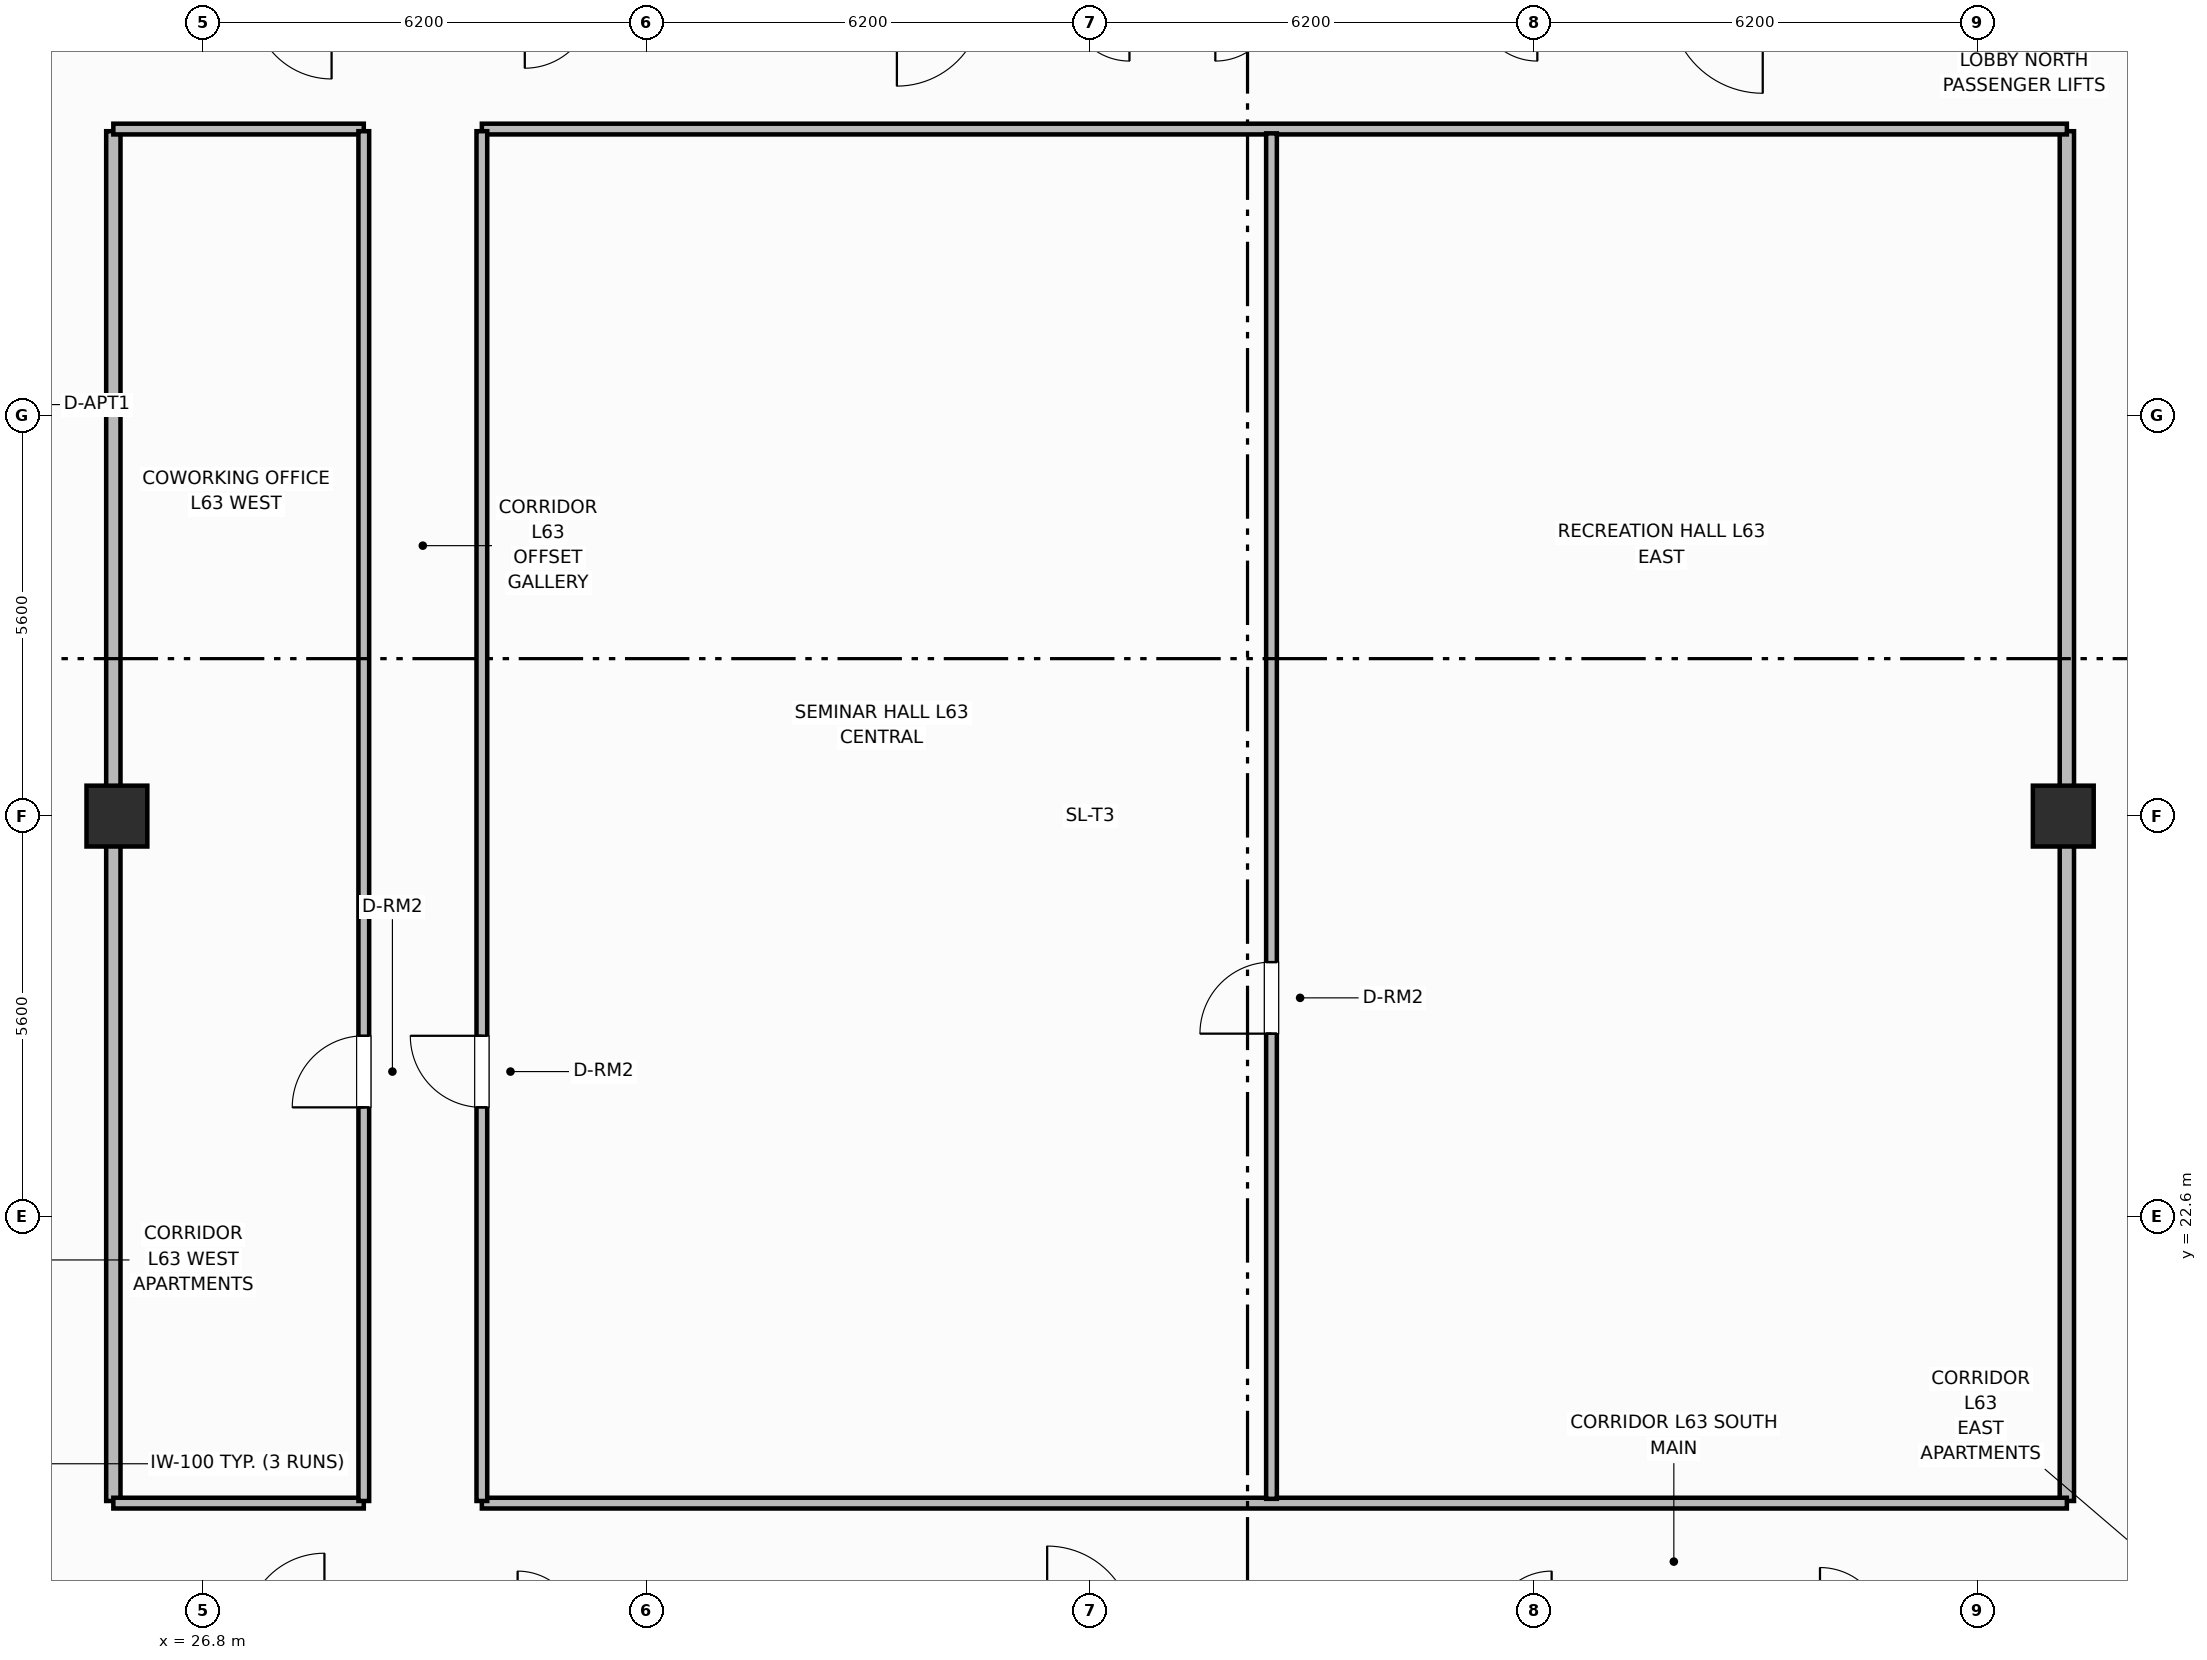
"""IFC4 building model, lengths in metres.
Left out: names, types, materials, properties, quantities, classifications, styles, units other than length and angle.
Written with IfcOpenShell. Run it as: python <this file> out.ifc"""

import sys

from ifc_helpers import new_model, si_unit, direction, frame, frame_2d, origin, origin_2d, place, context, subcontext, project, spatial, rectangle, extrude, element, fill, save


model = new_model("IFC4")
c1 = context("Model", 3, precision=1e-05, world=origin(), true_north=direction((0.0, 1.0)))
c2 = subcontext(c1, "Body", "Model", "MODEL_VIEW")
j1 = project(units=[si_unit("LENGTHUNIT", "METRE"), si_unit("PLANEANGLEUNIT", "RADIAN")], contexts=[c1])
p1 = place(None, origin())
s1 = spatial("IfcSite", under=j1, at=p1, CompositionType="ELEMENT")
p2 = place(p1, origin())
s2 = spatial("IfcBuilding", under=s1, at=p2, CompositionType="ELEMENT")
p3 = place(p2, frame((0.0, 0.0, 251.7)))
s3 = spatial("IfcBuildingStorey", under=s2, at=p3, CompositionType="ELEMENT", Elevation=251.7)
for number, where, z_axis, x_axis in (
    (1, (25.6, 28.2, 0.0), (0.0, 0.0, 1.0), (1.0, 0.0, 0.0)),
    (2, (52.8, 28.2, 0.0), (0.0, 0.0, 1.0), (1.0, 0.0, 0.0)),
):
    element("IfcColumn", number, at=place(p3, frame(where, z_axis=z_axis, x_axis=x_axis)), inside=s3, PredefinedType="COLUMN", context=c2, shape_type="SweptSolid", body=[
        extrude(rectangle(XDim=0.85, YDim=0.85, at=origin_2d()), origin(), (0.0, 0.0, 1.0), 3.7),
    ])
for number, where, z_axis, x_axis in (
    (3, (25.55, 18.63, 0.0), (0.0, 0.0, 1.0), (0.0, 1.0, 0.0)),
    (4, (52.85, 18.63, 0.0), (0.0, 0.0, 1.0), (0.0, 1.0, 0.0)),
):
    element("IfcWall", number, at=place(p3, frame(where, z_axis=z_axis, x_axis=x_axis)), inside=s3, PredefinedType="PARTITIONING", context=c2, shape_type="SweptSolid", body=[
        extrude(rectangle(XDim=19.14, YDim=0.2, at=frame_2d((9.57, 0.0))), origin(), (0.0, 0.0, 1.0), 2.56),
    ])
p4 = place(p3, frame((25.55, 18.6, 0.0), z_axis=(0.0, 0.0, 1.0), x_axis=(1.0, 0.0, 0.0)))
e5 = element("IfcWall", 5, at=p4, inside=s3, PredefinedType="PARTITIONING", context=c2, shape_type="SweptSolid", body=[
    extrude(rectangle(XDim=3.5, YDim=0.15, at=frame_2d((1.75, 0.0))), origin(), (0.0, 0.0, 1.0), 2.56),
])
p5 = place(p3, frame((30.7, 18.6, 0.0), z_axis=(0.0, 0.0, 1.0), x_axis=(1.0, 0.0, 0.0)))
e6 = element("IfcWall", 6, at=p5, inside=s3, PredefinedType="PARTITIONING", context=c2, shape_type="SweptSolid", body=[
    extrude(rectangle(XDim=22.15, YDim=0.15, at=frame_2d((11.075, 0.0))), origin(), (0.0, 0.0, 1.0), 2.56),
])
p6 = place(p3, frame((25.55, 37.8, 0.0), z_axis=(0.0, 0.0, 1.0), x_axis=(1.0, 0.0, 0.0)))
e7 = element("IfcWall", 7, at=p6, inside=s3, PredefinedType="PARTITIONING", context=c2, shape_type="SweptSolid", body=[
    extrude(rectangle(XDim=3.5, YDim=0.15, at=frame_2d((1.75, 0.0))), origin(), (0.0, 0.0, 1.0), 2.56),
])
p7 = place(p3, frame((30.7, 37.8, 0.0), z_axis=(0.0, 0.0, 1.0), x_axis=(1.0, 0.0, 0.0)))
e8 = element("IfcWall", 8, at=p7, inside=s3, PredefinedType="PARTITIONING", context=c2, shape_type="SweptSolid", body=[
    extrude(rectangle(XDim=22.15, YDim=0.15, at=frame_2d((11.075, 0.0))), origin(), (0.0, 0.0, 1.0), 2.56),
])
p8 = place(p3, frame((41.735, 18.66, 0.0), z_axis=(0.0, 0.0, 1.0), x_axis=(0.0, 1.0, 0.0)))
e9 = element("IfcWall", 9, at=p8, inside=s3, PredefinedType="PARTITIONING", context=c2, shape_type="SweptSolid", body=[
    extrude(rectangle(XDim=19.08, YDim=0.15, at=frame_2d((9.54, 0.0))), origin(), (0.0, 0.0, 1.0), 2.56),
])
p9 = place(p8, frame((6.5, 0.0, 0.0)))
e10 = element("IfcOpeningElement", 10, at=p9, cuts=e9, PredefinedType="OPENING", context=c2, shape_type="SweptSolid", body=[
    extrude(rectangle(XDim=1.0, YDim=2.15, at=frame_2d((0.5, 1.075))), frame((0.0, 0.085, 0.0), z_axis=(0.0, -1.0, 0.0), x_axis=(1.0, 0.0, 0.0)), (0.0, 0.0, 1.0), 0.17),
])
p10 = place(p3, frame((29.05, 18.63, 0.0), z_axis=(0.0, 0.0, 1.0), x_axis=(0.0, 1.0, 0.0)))
e11 = element("IfcWall", 11, at=p10, inside=s3, PredefinedType="PARTITIONING", context=c2, shape_type="SweptSolid", body=[
    extrude(rectangle(XDim=19.14, YDim=0.15, at=frame_2d((9.57, 0.0))), origin(), (0.0, 0.0, 1.0), 2.56),
])
p11 = place(p10, frame((5.5, 0.0, 0.0)))
e12 = element("IfcOpeningElement", 12, at=p11, cuts=e11, PredefinedType="OPENING", context=c2, shape_type="SweptSolid", body=[
    extrude(rectangle(XDim=1.0, YDim=2.15, at=frame_2d((0.5, 1.075))), frame((0.0, 0.085, 0.0), z_axis=(0.0, -1.0, 0.0), x_axis=(1.0, 0.0, 0.0)), (0.0, 0.0, 1.0), 0.17),
])
p12 = place(p3, frame((30.7, 18.63, 0.0), z_axis=(0.0, 0.0, 1.0), x_axis=(0.0, 1.0, 0.0)))
e13 = element("IfcWall", 13, at=p12, inside=s3, PredefinedType="PARTITIONING", context=c2, shape_type="SweptSolid", body=[
    extrude(rectangle(XDim=19.14, YDim=0.15, at=frame_2d((9.57, 0.0))), origin(), (0.0, 0.0, 1.0), 2.56),
])
p13 = place(p12, frame((5.5, 0.0, 0.0)))
e14 = element("IfcOpeningElement", 14, at=p13, cuts=e13, PredefinedType="OPENING", context=c2, shape_type="SweptSolid", body=[
    extrude(rectangle(XDim=1.0, YDim=2.15, at=frame_2d((0.5, 1.075))), frame((0.0, 0.085, 0.0), z_axis=(0.0, -1.0, 0.0), x_axis=(1.0, 0.0, 0.0)), (0.0, 0.0, 1.0), 0.17),
])
p14 = place(p9, origin())
e15 = element("IfcDoor", 15, at=p14, inside=s3, OperationType="SINGLE_SWING_LEFT", PredefinedType="DOOR", context=c2, shape_type="SweptSolid", body=[
    extrude(rectangle(XDim=1.0, YDim=2.15, at=frame_2d((0.5, 1.075))), frame((0.0, 0.025, 0.0), z_axis=(0.0, -1.0, 0.0), x_axis=(1.0, 0.0, 0.0)), (0.0, 0.0, 1.0), 0.05),
])
fill(e10, e15)
p15 = place(p11, origin())
e16 = element("IfcDoor", 16, at=p15, inside=s3, OperationType="SINGLE_SWING_LEFT", PredefinedType="DOOR", context=c2, shape_type="SweptSolid", body=[
    extrude(rectangle(XDim=1.0, YDim=2.15, at=frame_2d((0.5, 1.075))), frame((0.0, 0.025, 0.0), z_axis=(0.0, -1.0, 0.0), x_axis=(1.0, 0.0, 0.0)), (0.0, 0.0, 1.0), 0.05),
])
fill(e12, e16)
p16 = place(p13, origin())
e17 = element("IfcDoor", 17, at=p16, inside=s3, OperationType="SINGLE_SWING_RIGHT", PredefinedType="DOOR", context=c2, shape_type="SweptSolid", body=[
    extrude(rectangle(XDim=1.0, YDim=2.15, at=frame_2d((0.5, 1.075))), frame((0.0, 0.025, 0.0), z_axis=(0.0, -1.0, 0.0), x_axis=(1.0, 0.0, 0.0)), (0.0, 0.0, 1.0), 0.05),
])
fill(e14, e17)
save(model, sys.argv[1])
